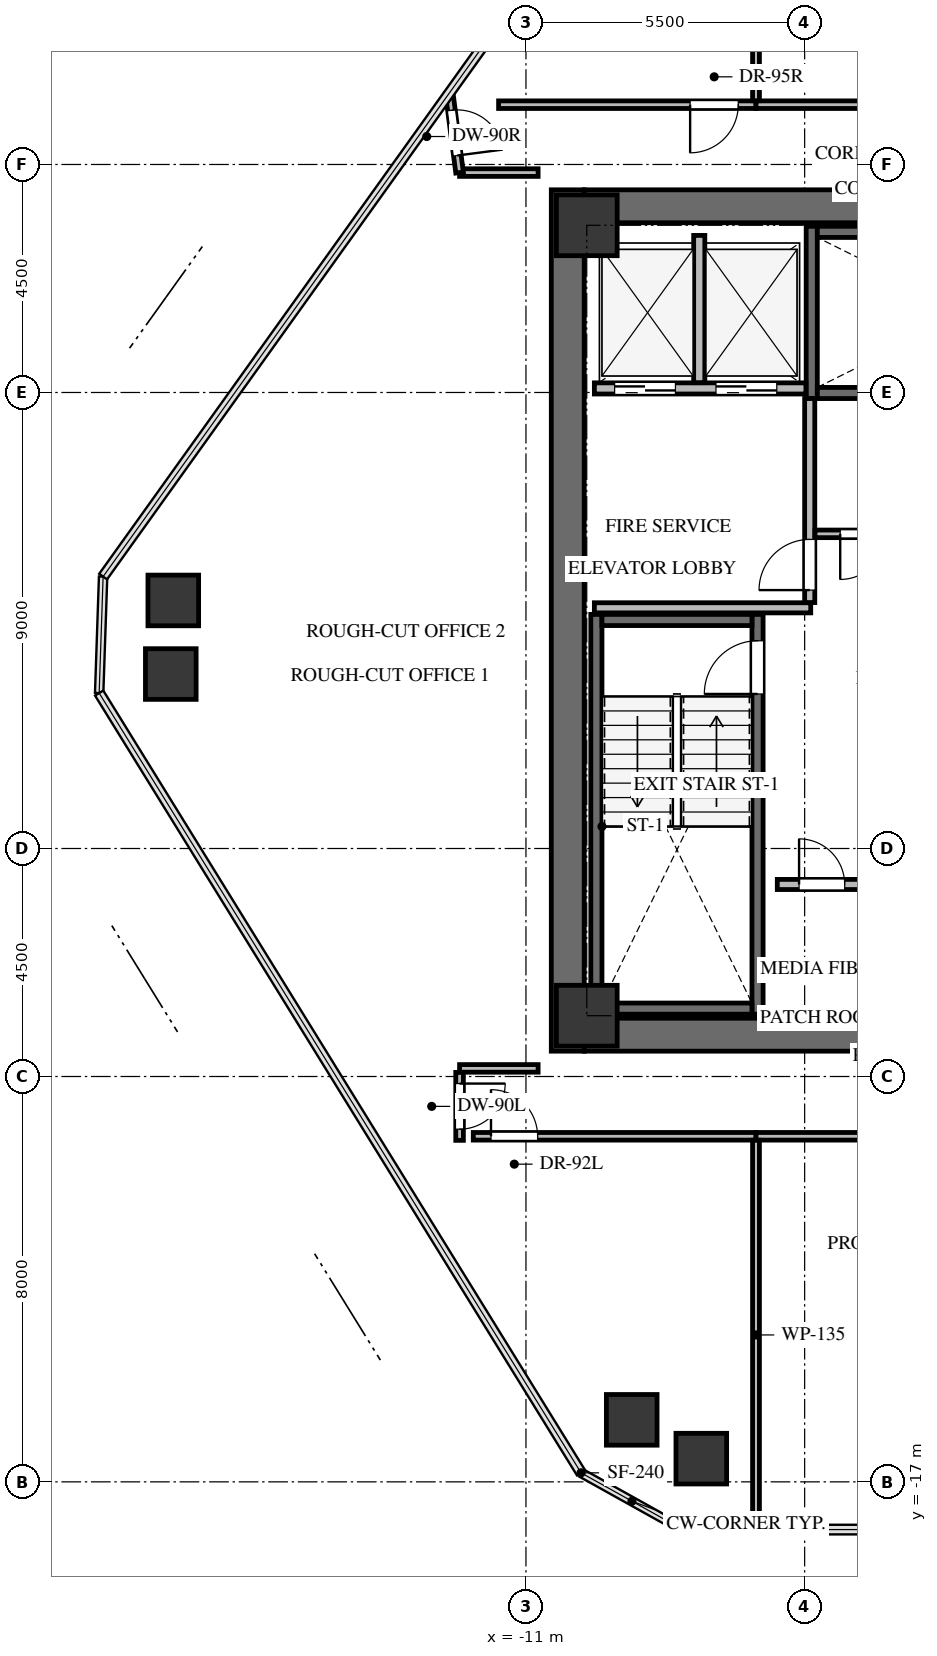
"""IFC4 building model, lengths in metres.
Left out: names, types, materials, properties, quantities, classifications, styles, units other than length and angle.
Written with IfcOpenShell. Run it as: python <this file> out.ifc"""

import sys

from ifc_helpers import new_model, si_unit, direction, frame, frame_2d, origin, origin_2d, place, context, subcontext, project, spatial, rectangle, extrude, source, transform, mapped, element, fill, save


model = new_model("IFC4")
c1 = context("Model", 3, precision=1e-05, world=origin(), true_north=direction((0.0, 1.0)))
c2 = subcontext(c1, "Body", "Model", "MODEL_VIEW")
j1 = project(units=[si_unit("LENGTHUNIT", "METRE"), si_unit("PLANEANGLEUNIT", "RADIAN")], contexts=[c1])
p1 = place(None, origin())
s1 = spatial("IfcSite", under=j1, at=p1, CompositionType="ELEMENT")
p2 = place(p1, origin())
s2 = spatial("IfcBuilding", under=s1, at=p2, CompositionType="ELEMENT")
p3 = place(p2, frame((0.0, 0.0, 177.1)))
s3 = spatial("IfcBuildingStorey", under=s2, at=p3, CompositionType="ELEMENT", Elevation=177.1)
p4 = place(p3, frame((-10.175, -8.5, 0.0), z_axis=(0.0, 0.0, 1.0), x_axis=(0.0, 1.0, 0.0)))
e1 = element("IfcWall", 1, at=p4, inside=s3, PredefinedType="SHEAR", context=c2, shape_type="SweptSolid", body=[
    extrude(rectangle(XDim=17.0, YDim=0.65, at=frame_2d((8.5, 0.0))), origin(), (0.0, 0.0, 1.0), 3.3),
])
p5 = place(p3, frame((-9.85, -8.175, 0.0), z_axis=(0.0, 0.0, 1.0), x_axis=(1.0, 0.0, 0.0)))
e2 = element("IfcWall", 2, at=p5, inside=s3, PredefinedType="SHEAR", context=c2, shape_type="SweptSolid", body=[
    extrude(rectangle(XDim=7.75, YDim=0.65, at=frame_2d((3.875, 0.0))), origin(), (0.0, 0.0, 1.0), 3.3),
])
p6 = place(p3, frame((-9.85, 8.175, 0.0), z_axis=(0.0, 0.0, 1.0), x_axis=(1.0, 0.0, 0.0)))
e3 = element("IfcWall", 3, at=p6, inside=s3, PredefinedType="SHEAR", context=c2, shape_type="SweptSolid", body=[
    extrude(rectangle(XDim=19.7, YDim=0.65, at=frame_2d((9.85, 0.0))), origin(), (0.0, 0.0, 1.0), 3.3),
])
p7 = place(p3, frame((-6.43, -7.77, -0.24), z_axis=(0.0, 0.0, 1.0), x_axis=(0.0, 1.0, 0.0)))
e4 = element("IfcWall", 4, at=p7, inside=s3, PredefinedType="SHEAR", context=c2, shape_type="SweptSolid", body=[
    extrude(rectangle(XDim=7.89, YDim=0.22, at=frame_2d((3.945, 0.0))), origin(), (0.0, 0.0, 1.0), 3.3),
])
p8 = place(p7, frame((6.32, 0.0, 0.0)))
e5 = element("IfcOpeningElement", 5, at=p8, cuts=e4, PredefinedType="OPENING", context=c2, shape_type="SweptSolid", body=[
    extrude(rectangle(XDim=1.05, YDim=2.15, at=frame_2d((0.525, 1.075))), frame((0.0, 0.12, 0.0), z_axis=(0.0, -1.0, 0.0), x_axis=(1.0, 0.0, 0.0)), (0.0, 0.0, 1.0), 0.24),
])
p9 = place(p3, frame((-9.61, 0.12, -0.24), z_axis=(0.0, 0.0, 1.0), x_axis=(0.0, -1.0, 0.0)))
e6 = element("IfcWall", 6, at=p9, inside=s3, PredefinedType="SHEAR", context=c2, shape_type="SweptSolid", body=[
    extrude(rectangle(XDim=7.89, YDim=0.22, at=frame_2d((3.945, 0.0))), origin(), (0.0, 0.0, 1.0), 3.3),
])
for number, where, z_axis, x_axis in (
    (7, (-9.5, -7.66, -0.24), (0.0, 0.0, 1.0), (1.0, 0.0, 0.0)),
    (8, (-6.54, 0.01, -0.24), (0.0, 0.0, 1.0), (-1.0, 0.0, 0.0)),
):
    element("IfcWall", number, at=place(p3, frame(where, z_axis=z_axis, x_axis=x_axis)), inside=s3, PredefinedType="SHEAR", context=c2, shape_type="SweptSolid", body=[
        extrude(rectangle(XDim=2.96, YDim=0.22, at=frame_2d((1.48, 0.0))), origin(), (0.0, 0.0, 1.0), 3.3),
    ])
p10 = place(p3, frame((-5.36, 7.78, -0.24), z_axis=(0.0, 0.0, 1.0), x_axis=(0.0, -1.0, 0.0)))
e9 = element("IfcWall", 9, at=p10, inside=s3, PredefinedType="SHEAR", context=c2, shape_type="SweptSolid", body=[
    extrude(rectangle(XDim=3.4, YDim=0.22, at=frame_2d((1.7, 0.0))), origin(), (0.0, 0.0, 1.0), 3.3),
])
p11 = place(p3, frame((-5.25, 4.49, -0.24), z_axis=(0.0, 0.0, 1.0), x_axis=(1.0, 0.0, 0.0)))
e10 = element("IfcWall", 10, at=p11, inside=s3, PredefinedType="SHEAR", context=c2, shape_type="SweptSolid", body=[
    extrude(rectangle(XDim=7.35, YDim=0.22, at=frame_2d((3.675, 0.0))), origin(), (0.0, 0.0, 1.0), 3.3),
])
p12 = place(p11, frame((5.85, 0.0, 0.0)))
e11 = element("IfcOpeningElement", 11, at=p12, cuts=e10, PredefinedType="OPENING", context=c2, shape_type="SweptSolid", body=[
    extrude(rectangle(XDim=1.05, YDim=2.15, at=frame_2d((0.525, 1.075))), frame((0.0, 0.12, 0.0), z_axis=(0.0, -1.0, 0.0), x_axis=(1.0, 0.0, 0.0)), (0.0, 0.0, 1.0), 0.24),
])
p13 = place(p3, frame((2.1, 7.67, -0.24), z_axis=(0.0, 0.0, 1.0), x_axis=(-1.0, 0.0, 0.0)))
e12 = element("IfcWall", 12, at=p13, inside=s3, PredefinedType="SHEAR", context=c2, shape_type="SweptSolid", body=[
    extrude(rectangle(XDim=7.35, YDim=0.22, at=frame_2d((3.675, 0.0))), origin(), (0.0, 0.0, 1.0), 3.3),
])
m1 = source(origin(), c2, "Body", "SweptSolid", [
    extrude(rectangle(XDim=1.2, YDim=1.2, at=origin_2d()), origin(), (0.0, 0.0, 1.0), 3.3),
])
for number, where, z_axis, x_axis in (
    (13, (-9.8, -7.8, -0.24), (0.0, 0.0, 1.0), (1.0, 0.0, 0.0)),
    (14, (-9.8, 7.8, -0.24), (0.0, 0.0, 1.0), (1.0, 0.0, 0.0)),
):
    element("IfcColumn", number, at=place(p3, frame(where, z_axis=z_axis, x_axis=x_axis)), inside=s3, PredefinedType="COLUMN", context=c2, shape_type="MappedRepresentation", body=[
        mapped(m1, transform((0.0, 0.0, 0.0), x_axis=(1.0, 0.0, 0.0), y_axis=(0.0, 1.0, 0.0), z_axis=(0.0, 0.0, 1.0), scale=1.0)),
    ])
m2 = source(origin(), c2, "Body", "SweptSolid", [
    extrude(rectangle(XDim=1.0, YDim=1.0, at=origin_2d()), origin(), (0.0, 0.0, 1.0), 3.3),
])
for number, where, z_axis, x_axis in (
    (15, (-8.913, -15.776, -0.24), (0.0, 0.0, 1.0), (1.0, 0.0, 0.0)),
    (16, (-18.009, -1.057, -0.24), (0.0, 0.0, 1.0), (1.0, 0.0, 0.0)),
    (17, (-17.96, 0.396, -0.24), (0.0, 0.0, 1.0), (1.0, 0.0, 0.0)),
    (18, (-7.54, -16.542, -0.24), (0.0, 0.0, 1.0), (1.0, 0.0, 0.0)),
):
    element("IfcColumn", number, at=place(p3, frame(where, z_axis=z_axis, x_axis=x_axis)), inside=s3, PredefinedType="COLUMN", context=c2, shape_type="MappedRepresentation", body=[
        mapped(m2, transform((0.0, 0.0, 0.0), x_axis=(1.0, 0.0, 0.0), y_axis=(0.0, 1.0, 0.0), z_axis=(0.0, 0.0, 1.0), scale=1.0)),
    ])
p14 = place(p3, frame((-9.65, 4.58, 0.0), z_axis=(0.0, 0.0, 1.0), x_axis=(1.0, 0.0, 0.0)))
e19 = element("IfcWall", 19, at=p14, inside=s3, PredefinedType="SOLIDWALL", context=c2, shape_type="SweptSolid", body=[
    extrude(rectangle(XDim=4.175, YDim=0.22, at=frame_2d((2.087, 0.0))), origin(), (0.0, 0.0, 1.0), 3.045),
])
p15 = place(p14, frame((0.4, 0.0, 0.0)))
e20 = element("IfcOpeningElement", 20, at=p15, cuts=e19, PredefinedType="OPENING", context=c2, shape_type="SweptSolid", body=[
    extrude(rectangle(XDim=1.2, YDim=2.15, at=frame_2d((0.6, 1.075))), frame((0.0, 0.12, 0.0), z_axis=(0.0, -1.0, 0.0), x_axis=(1.0, 0.0, 0.0)), (0.0, 0.0, 1.0), 0.24),
])
p16 = place(p14, frame((2.4, 0.0, 0.0)))
e21 = element("IfcOpeningElement", 21, at=p16, cuts=e19, PredefinedType="OPENING", context=c2, shape_type="SweptSolid", body=[
    extrude(rectangle(XDim=1.2, YDim=2.15, at=frame_2d((0.6, 1.075))), frame((0.0, 0.12, 0.0), z_axis=(0.0, -1.0, 0.0), x_axis=(1.0, 0.0, 0.0)), (0.0, 0.0, 1.0), 0.24),
])
p17 = place(p3, frame((-7.58, 4.694, 0.0), z_axis=(0.0, 0.0, 1.0), x_axis=(0.0, 1.0, 0.0)))
e22 = element("IfcWall", 22, at=p17, inside=s3, PredefinedType="SOLIDWALL", context=c2, shape_type="SweptSolid", body=[
    extrude(rectangle(XDim=2.906, YDim=0.22, at=frame_2d((1.453, 0.0))), origin(), (0.0, 0.0, 1.0), 3.045),
])
p18 = place(p3, frame((-9.65, 0.25, 0.0), z_axis=(0.0, 0.0, 1.0), x_axis=(1.0, 0.0, 0.0)))
e23 = element("IfcWall", 23, at=p18, inside=s3, PredefinedType="SOLIDWALL", context=c2, shape_type="SweptSolid", body=[
    extrude(rectangle(XDim=4.27, YDim=0.2, at=frame_2d((2.135, 0.0))), origin(), (0.0, 0.0, 1.0), 3.045),
])
p19 = place(p3, frame((-5.4, 0.354, 0.0), z_axis=(0.0, 0.0, 1.0), x_axis=(0.0, 1.0, 0.0)))
e24 = element("IfcWall", 24, at=p19, inside=s3, PredefinedType="SOLIDWALL", context=c2, shape_type="SweptSolid", body=[
    extrude(rectangle(XDim=4.026, YDim=0.2, at=frame_2d((2.013, 0.0))), origin(), (0.0, 0.0, 1.0), 3.045),
])
p20 = place(p19, frame((0.246, 0.0, 0.0)))
e25 = element("IfcOpeningElement", 25, at=p20, cuts=e24, PredefinedType="OPENING", context=c2, shape_type="SweptSolid", body=[
    extrude(rectangle(XDim=1.0, YDim=2.15, at=frame_2d((0.5, 1.075))), frame((0.0, 0.11, 0.0), z_axis=(0.0, -1.0, 0.0), x_axis=(1.0, 0.0, 0.0)), (0.0, 0.0, 1.0), 0.22),
])
p21 = place(p3, frame((-6.04, -5.21, 0.0), z_axis=(0.0, 0.0, 1.0), x_axis=(1.0, 0.0, 0.0)))
e26 = element("IfcWall", 26, at=p21, inside=s3, PredefinedType="SOLIDWALL", context=c2, shape_type="SweptSolid", body=[
    extrude(rectangle(XDim=1.76, YDim=0.2, at=frame_2d((0.88, 0.0))), origin(), (0.0, 0.0, 1.0), 3.045),
])
p22 = place(p21, frame((0.43, 0.0, 0.0)))
e27 = element("IfcOpeningElement", 27, at=p22, cuts=e26, PredefinedType="OPENING", context=c2, shape_type="SweptSolid", body=[
    extrude(rectangle(XDim=0.9, YDim=2.05, at=frame_2d((0.45, 1.025))), frame((0.0, 0.11, 0.0), z_axis=(0.0, -1.0, 0.0), x_axis=(1.0, 0.0, 0.0)), (0.0, 0.0, 1.0), 0.22),
])
p23 = place(p3, frame((-3.4, 1.71, 0.0), z_axis=(0.0, 0.0, 1.0), x_axis=(-1.0, 0.0, 0.0)))
e28 = element("IfcWall", 28, at=p23, inside=s3, PredefinedType="PARTITIONING", context=c2, shape_type="SweptSolid", body=[
    extrude(rectangle(XDim=1.896, YDim=0.15, at=frame_2d((0.948, 0.0))), origin(), (0.0, 0.0, 1.0), 3.045),
])
p24 = place(p23, frame((0.498, 0.0, 0.0)))
e29 = element("IfcOpeningElement", 29, at=p24, cuts=e28, PredefinedType="OPENING", context=c2, shape_type="SweptSolid", body=[
    extrude(rectangle(XDim=0.9, YDim=2.05, at=frame_2d((0.45, 1.025))), frame((0.0, 0.085, 0.0), z_axis=(0.0, -1.0, 0.0), x_axis=(1.0, 0.0, 0.0)), (0.0, 0.0, 1.0), 0.17),
])
p25 = place(p3, frame((-6.46, 10.18, 0.0), z_axis=(0.0, 0.0, 1.0), x_axis=(-1.0, 0.0, 0.0)))
e30 = element("IfcWall", 30, at=p25, inside=s3, PredefinedType="PARTITIONING", context=c2, shape_type="SweptSolid", body=[
    extrude(rectangle(XDim=5.08, YDim=0.15, at=frame_2d((2.54, 0.0))), origin(), (0.0, 0.0, 1.0), 2.242),
])
p26 = place(p25, frame((0.35, 0.0, 0.0)))
e31 = element("IfcOpeningElement", 31, at=p26, cuts=e30, PredefinedType="OPENING", context=c2, shape_type="SweptSolid", body=[
    extrude(rectangle(XDim=0.95, YDim=2.1, at=frame_2d((0.475, 1.05))), frame((0.0, 0.085, 0.0), z_axis=(0.0, -1.0, 0.0), x_axis=(1.0, 0.0, 0.0)), (0.0, 0.0, 1.0), 0.17),
])
p27 = place(p3, frame((-1.089, 10.18, 0.0), z_axis=(0.0, 0.0, 1.0), x_axis=(-1.0, 0.0, 0.0)))
e32 = element("IfcWall", 32, at=p27, inside=s3, PredefinedType="PARTITIONING", context=c2, shape_type="SweptSolid", body=[
    extrude(rectangle(XDim=5.371, YDim=0.15, at=frame_2d((2.686, 0.0))), origin(), (0.0, 0.0, 1.0), 2.242),
])
p28 = place(p3, frame((-12.04, -10.18, 0.0), z_axis=(0.0, 0.0, 1.0), x_axis=(1.0, 0.0, 0.0)))
e33 = element("IfcWall", 33, at=p28, inside=s3, PredefinedType="PARTITIONING", context=c2, shape_type="SweptSolid", body=[
    extrude(rectangle(XDim=5.58, YDim=0.15, at=frame_2d((2.79, 0.0))), origin(), (0.0, 0.0, 1.0), 3.045),
])
p29 = place(p28, frame((0.35, 0.0, 0.0)))
e34 = element("IfcOpeningElement", 34, at=p29, cuts=e33, PredefinedType="OPENING", context=c2, shape_type="SweptSolid", body=[
    extrude(rectangle(XDim=0.92, YDim=2.1, at=frame_2d((0.46, 1.05))), frame((0.0, 0.085, 0.0), z_axis=(0.0, -1.0, 0.0), x_axis=(1.0, 0.0, 0.0)), (0.0, 0.0, 1.0), 0.17),
])
p30 = place(p3, frame((-6.46, -10.18, 0.0), z_axis=(0.0, 0.0, 1.0), x_axis=(1.0, 0.0, 0.0)))
e35 = element("IfcWall", 35, at=p30, inside=s3, PredefinedType="PARTITIONING", context=c2, shape_type="SweptSolid", body=[
    extrude(rectangle(XDim=5.371, YDim=0.15, at=frame_2d((2.686, 0.0))), origin(), (0.0, 0.0, 1.0), 2.242),
])
p31 = place(p3, frame((-10.76, -8.84, 0.0), z_axis=(0.0, 0.0, 1.0), x_axis=(-1.0, 0.0, 0.0)))
e36 = element("IfcWall", 36, at=p31, inside=s3, PredefinedType="PARTITIONING", context=c2, shape_type="SweptSolid", body=[
    extrude(rectangle(XDim=1.55, YDim=0.15, at=frame_2d((0.775, 0.0))), origin(), (0.0, 0.0, 1.0), 3.045),
])
p32 = place(p3, frame((-12.31, -8.919, 0.0), z_axis=(0.0, 0.0, 1.0), x_axis=(0.0, -1.0, 0.0)))
e37 = element("IfcWall", 37, at=p32, inside=s3, PredefinedType="PARTITIONING", context=c2, shape_type="SweptSolid", body=[
    extrude(rectangle(XDim=1.341, YDim=0.15, at=frame_2d((0.67, 0.0))), origin(), (0.0, 0.0, 1.0), 2.399),
])
p33 = place(p32, frame((0.22, 0.0, 0.0)))
e38 = element("IfcOpeningElement", 38, at=p33, cuts=e37, PredefinedType="OPENING", context=c2, shape_type="SweptSolid", body=[
    extrude(rectangle(XDim=0.9, YDim=2.05, at=frame_2d((0.45, 1.025))), frame((0.0, 0.085, 0.0), z_axis=(0.0, -1.0, 0.0), x_axis=(1.0, 0.0, 0.0)), (0.0, 0.0, 1.0), 0.17),
])
p34 = place(p3, frame((-12.31, 8.84, 0.0), z_axis=(0.0, 0.0, 1.0), x_axis=(1.0, 0.0, 0.0)))
e39 = element("IfcWall", 39, at=p34, inside=s3, PredefinedType="PARTITIONING", context=c2, shape_type="SweptSolid", body=[
    extrude(rectangle(XDim=1.55, YDim=0.15, at=frame_2d((0.775, 0.0))), origin(), (0.0, 0.0, 1.0), 2.399),
])
p35 = place(p3, frame((-12.514, 10.406, 0.0), z_axis=(0.0, 0.0, 1.0), x_axis=(0.129378833178, -0.991595238757, 0.0)))
e40 = element("IfcWall", 40, at=p35, inside=s3, PredefinedType="PARTITIONING", context=c2, shape_type="SweptSolid", body=[
    extrude(rectangle(XDim=1.579, YDim=0.15, at=frame_2d((0.79, 0.0))), origin(), (0.0, 0.0, 1.0), 3.045),
])
p36 = place(p35, frame((0.34, 0.0, 0.0)))
e41 = element("IfcOpeningElement", 41, at=p36, cuts=e40, PredefinedType="OPENING", context=c2, shape_type="SweptSolid", body=[
    extrude(rectangle(XDim=0.9, YDim=2.05, at=frame_2d((0.45, 1.025))), frame((0.0, 0.085, 0.0), z_axis=(0.0, -1.0, 0.0), x_axis=(1.0, 0.0, 0.0)), (0.0, 0.0, 1.0), 0.17),
])
p37 = place(p3, frame((-6.46, 15.102, 0.0), z_axis=(0.0, 0.0, 1.0), x_axis=(0.0, -1.0, 0.0)))
e42 = element("IfcWall", 42, at=p37, inside=s3, PredefinedType="PARTITIONING", context=c2, shape_type="SweptSolid", body=[
    extrude(rectangle(XDim=4.843, YDim=0.135, at=frame_2d((2.421, 0.0))), origin(), (0.0, 0.0, 1.0), 2.242),
])
p38 = place(p3, frame((-6.46, -10.259, 0.0), z_axis=(0.0, 0.0, 1.0), x_axis=(0.0, -1.0, 0.0)))
e43 = element("IfcWall", 43, at=p38, inside=s3, PredefinedType="PARTITIONING", context=c2, shape_type="SweptSolid", body=[
    extrude(rectangle(XDim=7.683, YDim=0.135, at=frame_2d((3.841, 0.0))), origin(), (0.0, 0.0, 1.0), 2.242),
])
m3 = source(origin(), c2, "Body", "SweptSolid", [
    extrude(rectangle(XDim=1.05, YDim=2.15, at=frame_2d((0.525, 1.075))), frame((0.0, 0.025, 0.0), z_axis=(0.0, -1.0, 0.0), x_axis=(1.0, 0.0, 0.0)), (0.0, 0.0, 1.0), 0.05),
])
p39 = place(p8, origin())
e44 = element("IfcDoor", 44, at=p39, inside=s3, OperationType="SINGLE_SWING_LEFT", PredefinedType="DOOR", context=c2, shape_type="MappedRepresentation", body=[
    mapped(m3, transform((0.0, 0.0, 0.0), x_axis=(1.0, 0.0, 0.0), y_axis=(0.0, 1.0, 0.0), z_axis=(0.0, 0.0, 1.0), scale=1.0)),
])
fill(e5, e44)
m4 = source(origin(), c2, "Body", "SweptSolid", [
    extrude(rectangle(XDim=1.2, YDim=2.15, at=frame_2d((0.6, 1.075))), frame((0.0, 0.025, 0.0), z_axis=(0.0, -1.0, 0.0), x_axis=(1.0, 0.0, 0.0)), (0.0, 0.0, 1.0), 0.05),
])
p40 = place(p15, origin())
e45 = element("IfcDoor", 45, at=p40, inside=s3, OperationType="DOUBLE_DOOR_SLIDING", PredefinedType="DOOR", context=c2, shape_type="MappedRepresentation", body=[
    mapped(m4, transform((0.0, 0.0, 0.0), x_axis=(1.0, 0.0, 0.0), y_axis=(0.0, 1.0, 0.0), z_axis=(0.0, 0.0, 1.0), scale=1.0)),
])
fill(e20, e45)
p41 = place(p16, origin())
e46 = element("IfcDoor", 46, at=p41, inside=s3, OperationType="DOUBLE_DOOR_SLIDING", PredefinedType="DOOR", context=c2, shape_type="MappedRepresentation", body=[
    mapped(m4, transform((0.0, 0.0, 0.0), x_axis=(1.0, 0.0, 0.0), y_axis=(0.0, 1.0, 0.0), z_axis=(0.0, 0.0, 1.0), scale=1.0)),
])
fill(e21, e46)
m5 = source(origin(), c2, "Body", "SweptSolid", [
    extrude(rectangle(XDim=1.0, YDim=2.15, at=frame_2d((0.5, 1.075))), frame((0.0, 0.025, 0.0), z_axis=(0.0, -1.0, 0.0), x_axis=(1.0, 0.0, 0.0)), (0.0, 0.0, 1.0), 0.05),
])
p42 = place(p20, origin())
e47 = element("IfcDoor", 47, at=p42, inside=s3, OperationType="SINGLE_SWING_LEFT", PredefinedType="DOOR", context=c2, shape_type="MappedRepresentation", body=[
    mapped(m5, transform((0.0, 0.0, 0.0), x_axis=(1.0, 0.0, 0.0), y_axis=(0.0, 1.0, 0.0), z_axis=(0.0, 0.0, 1.0), scale=1.0)),
])
fill(e25, e47)
m6 = source(origin(), c2, "Body", "SweptSolid", [
    extrude(rectangle(XDim=0.9, YDim=2.05, at=frame_2d((0.45, 1.025))), frame((0.0, 0.025, 0.0), z_axis=(0.0, -1.0, 0.0), x_axis=(1.0, 0.0, 0.0)), (0.0, 0.0, 1.0), 0.05),
])
p43 = place(p22, origin())
e48 = element("IfcDoor", 48, at=p43, inside=s3, OperationType="SINGLE_SWING_LEFT", PredefinedType="DOOR", context=c2, shape_type="MappedRepresentation", body=[
    mapped(m6, transform((0.0, 0.0, 0.0), x_axis=(1.0, 0.0, 0.0), y_axis=(0.0, 1.0, 0.0), z_axis=(0.0, 0.0, 1.0), scale=1.0)),
])
fill(e27, e48)
m7 = source(origin(), c2, "Body", "SweptSolid", [
    extrude(rectangle(XDim=0.9, YDim=2.05, at=frame_2d((0.45, 1.025))), frame((0.0, 0.025, 0.0), z_axis=(0.0, -1.0, 0.0), x_axis=(1.0, 0.0, 0.0)), (0.0, 0.0, 1.0), 0.05),
])
p44 = place(p24, origin())
e49 = element("IfcDoor", 49, at=p44, inside=s3, OperationType="SINGLE_SWING_RIGHT", PredefinedType="DOOR", context=c2, shape_type="MappedRepresentation", body=[
    mapped(m7, transform((0.0, 0.0, 0.0), x_axis=(1.0, 0.0, 0.0), y_axis=(0.0, 1.0, 0.0), z_axis=(0.0, 0.0, 1.0), scale=1.0)),
])
fill(e29, e49)
m8 = source(origin(), c2, "Body", "SweptSolid", [
    extrude(rectangle(XDim=0.95, YDim=2.1, at=frame_2d((0.475, 1.05))), frame((0.0, 0.025, 0.0), z_axis=(0.0, -1.0, 0.0), x_axis=(1.0, 0.0, 0.0)), (0.0, 0.0, 1.0), 0.05),
])
p45 = place(p26, origin())
e50 = element("IfcDoor", 50, at=p45, inside=s3, OperationType="SINGLE_SWING_RIGHT", PredefinedType="DOOR", context=c2, shape_type="MappedRepresentation", body=[
    mapped(m8, transform((0.0, 0.0, 0.0), x_axis=(1.0, 0.0, 0.0), y_axis=(0.0, 1.0, 0.0), z_axis=(0.0, 0.0, 1.0), scale=1.0)),
])
fill(e31, e50)
m9 = source(origin(), c2, "Body", "SweptSolid", [
    extrude(rectangle(XDim=0.92, YDim=2.1, at=frame_2d((0.46, 1.05))), frame((0.0, 0.025, 0.0), z_axis=(0.0, -1.0, 0.0), x_axis=(1.0, 0.0, 0.0)), (0.0, 0.0, 1.0), 0.05),
])
p46 = place(p29, origin())
e51 = element("IfcDoor", 51, at=p46, inside=s3, OperationType="SINGLE_SWING_LEFT", PredefinedType="DOOR", context=c2, shape_type="MappedRepresentation", body=[
    mapped(m9, transform((0.0, 0.0, 0.0), x_axis=(1.0, 0.0, 0.0), y_axis=(0.0, 1.0, 0.0), z_axis=(0.0, 0.0, 1.0), scale=1.0)),
])
fill(e34, e51)
m10 = source(origin(), c2, "Body", "SweptSolid", [
    extrude(rectangle(XDim=0.9, YDim=2.05, at=frame_2d((0.45, 1.025))), frame((0.0, 0.025, 0.0), z_axis=(0.0, -1.0, 0.0), x_axis=(1.0, 0.0, 0.0)), (0.0, 0.0, 1.0), 0.05),
])
p47 = place(p33, origin())
e52 = element("IfcDoor", 52, at=p47, inside=s3, OperationType="SINGLE_SWING_LEFT", PredefinedType="DOOR", context=c2, shape_type="MappedRepresentation", body=[
    mapped(m10, transform((0.0, 0.0, 0.0), x_axis=(1.0, 0.0, 0.0), y_axis=(0.0, 1.0, 0.0), z_axis=(0.0, 0.0, 1.0), scale=1.0)),
])
fill(e38, e52)
m11 = source(origin(), c2, "Body", "SweptSolid", [
    extrude(rectangle(XDim=0.9, YDim=2.05, at=frame_2d((0.45, 1.025))), frame((0.0, 0.025, 0.0), z_axis=(0.0, -1.0, 0.0), x_axis=(1.0, 0.0, 0.0)), (0.0, 0.0, 1.0), 0.05),
])
p48 = place(p36, origin())
e53 = element("IfcDoor", 53, at=p48, inside=s3, OperationType="SINGLE_SWING_RIGHT", PredefinedType="DOOR", context=c2, shape_type="MappedRepresentation", body=[
    mapped(m11, transform((0.0, 0.0, 0.0), x_axis=(1.0, 0.0, 0.0), y_axis=(0.0, 1.0, 0.0), z_axis=(0.0, 0.0, 1.0), scale=1.0)),
])
fill(e41, e53)
save(model, sys.argv[1])
